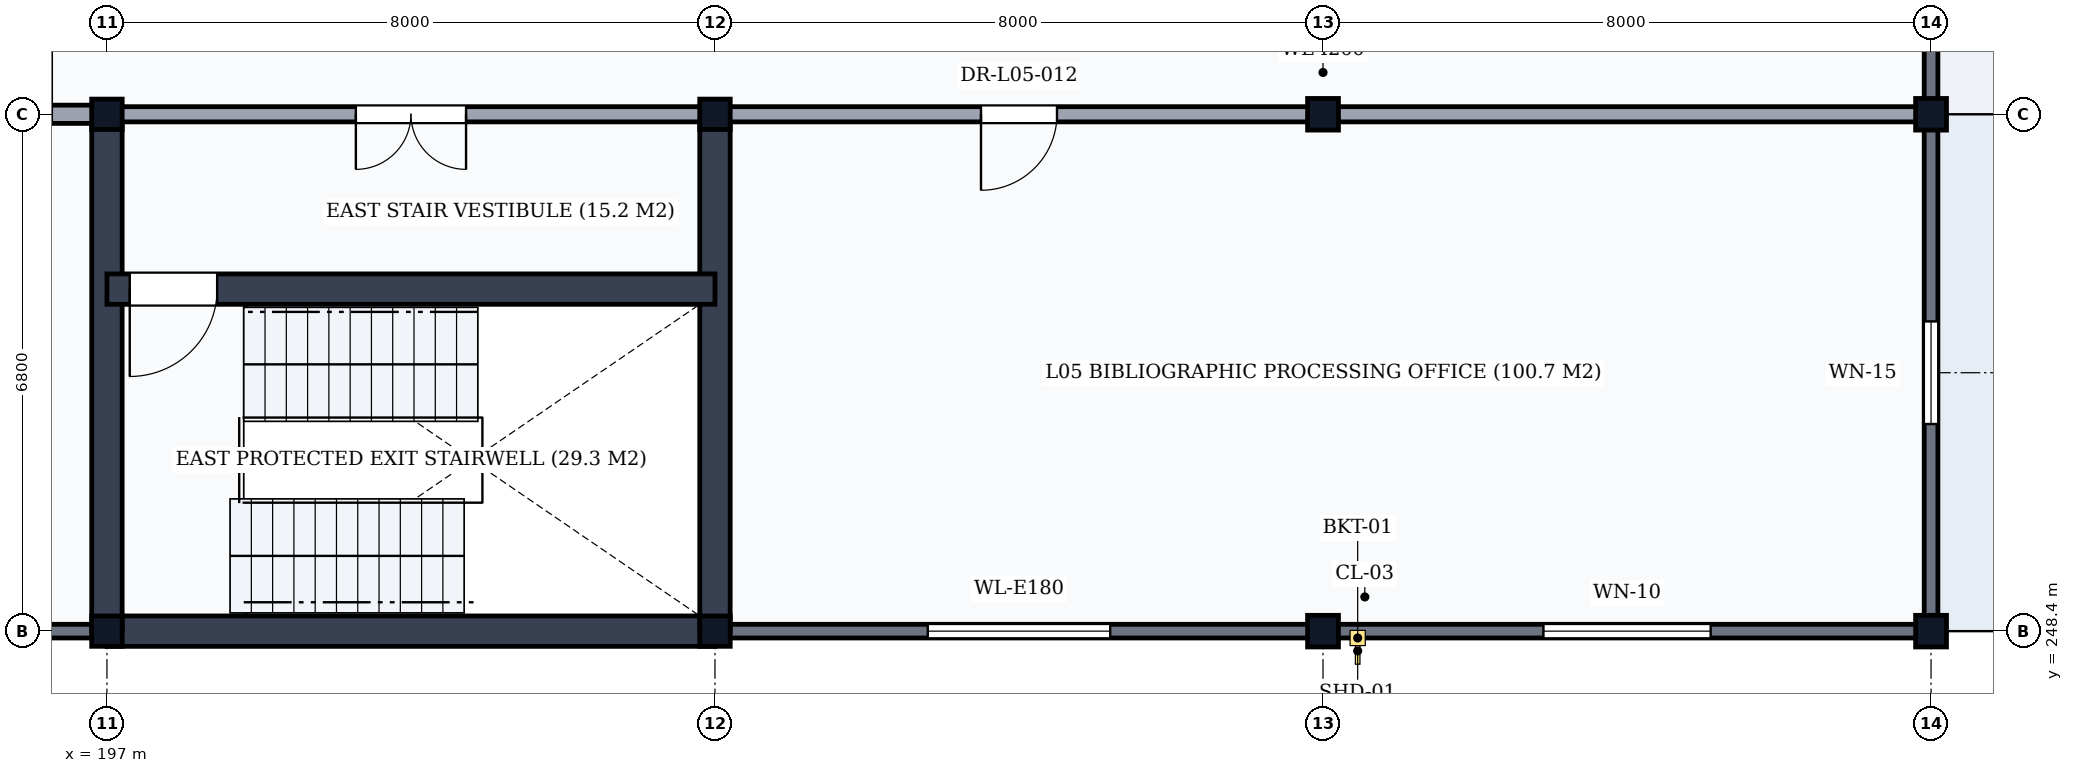
"""IFC4 building model, lengths in metres.
Left out: names, types, materials, properties, quantities, classifications, styles, units other than length and angle.
Written with IfcOpenShell. Run it as: python <this file> out.ifc"""

import sys

from ifc_helpers import new_model, si_unit, direction, frame, frame_2d, origin, origin_2d, place, context, subcontext, project, spatial, rectangle, i_section, extrude, element, fill, save


model = new_model("IFC4")
c1 = context("Model", 3, precision=1e-05, world=origin(), true_north=direction((0.0, 1.0)))
c2 = subcontext(c1, "Body", "Model", "MODEL_VIEW")
j1 = project(units=[si_unit("LENGTHUNIT", "METRE"), si_unit("PLANEANGLEUNIT", "RADIAN")], contexts=[c1])
p1 = place(None, origin())
s1 = spatial("IfcSite", under=j1, at=p1, CompositionType="ELEMENT")
p2 = place(p1, origin())
s2 = spatial("IfcBuilding", under=s1, at=p2, CompositionType="ELEMENT")
p3 = place(p2, frame((0.0, 0.0, 20.4)))
s3 = spatial("IfcBuildingStorey", under=s2, at=p3, CompositionType="ELEMENT", Elevation=20.4)
for number, where, z_axis, x_axis in (
    (1, (197.0, 248.4, 0.0), (0.0, 0.0, 1.0), (1.0, 0.0, 0.0)),
    (2, (197.0, 255.2, 0.0), (0.0, 0.0, 1.0), (1.0, 0.0, 0.0)),
    (3, (205.0, 248.4, 0.0), (0.0, 0.0, 1.0), (1.0, 0.0, 0.0)),
    (4, (205.0, 255.2, 0.0), (0.0, 0.0, 1.0), (1.0, 0.0, 0.0)),
):
    element("IfcColumn", number, at=place(p3, frame(where, z_axis=z_axis, x_axis=x_axis)), inside=s3, PredefinedType="COLUMN", context=c2, shape_type="SweptSolid", body=[
        extrude(i_section(OverallWidth=0.401, OverallDepth=0.399, WebThickness=0.025, FlangeThickness=0.04, FilletRadius=0.015, at=origin_2d()), origin(), (0.0, 0.0, 1.0), 3.9),
    ])
for number, where, z_axis, x_axis in (
    (5, (213.0, 248.4, 0.0), (0.0, 0.0, 1.0), (1.0, 0.0, 0.0)),
    (6, (213.0, 255.2, 0.0), (0.0, 0.0, 1.0), (1.0, 0.0, 0.0)),
    (7, (221.0, 248.4, 0.0), (0.0, 0.0, 1.0), (1.0, 0.0, 0.0)),
    (8, (221.0, 255.2, 0.0), (0.0, 0.0, 1.0), (1.0, 0.0, 0.0)),
):
    element("IfcColumn", number, at=place(p3, frame(where, z_axis=z_axis, x_axis=x_axis)), inside=s3, PredefinedType="COLUMN", context=c2, shape_type="SweptSolid", body=[
        extrude(i_section(OverallWidth=0.406, OverallDepth=0.416, WebThickness=0.03, FlangeThickness=0.048, FilletRadius=0.015, at=origin_2d()), origin(), (0.0, 0.0, 1.0), 3.9),
    ])
p4 = place(p3, frame((189.006, 248.4, 0.0), z_axis=(0.0, 0.0, 1.0), x_axis=(1.0, 0.0, 0.0)))
e9 = element("IfcWall", 9, at=p4, inside=s3, PredefinedType="SOLIDWALL", context=c2, shape_type="SweptSolid", body=[
    extrude(rectangle(XDim=7.988, YDim=0.18, at=frame_2d((3.994, 0.0))), origin(), (0.0, 0.0, 1.0), 3.348),
])
p5 = place(p3, frame((205.006, 248.4, 0.0), z_axis=(0.0, 0.0, 1.0), x_axis=(1.0, 0.0, 0.0)))
e10 = element("IfcWall", 10, at=p5, inside=s3, PredefinedType="SOLIDWALL", context=c2, shape_type="SweptSolid", body=[
    extrude(rectangle(XDim=7.988, YDim=0.18, at=frame_2d((3.994, 0.0))), origin(), (0.0, 0.0, 1.0), 3.348),
])
p6 = place(p5, frame((2.794, 0.0, 0.95)))
e11 = element("IfcOpeningElement", 11, at=p6, cuts=e10, PredefinedType="OPENING", context=c2, shape_type="SweptSolid", body=[
    extrude(rectangle(XDim=2.4, YDim=2.2, at=frame_2d((1.2, 1.1))), frame((0.0, 0.105, 0.0), z_axis=(0.0, -1.0, 0.0), x_axis=(1.0, 0.0, 0.0)), (0.0, 0.0, 1.0), 0.21),
])
p7 = place(p3, frame((213.006, 248.4, 0.0), z_axis=(0.0, 0.0, 1.0), x_axis=(1.0, 0.0, 0.0)))
e12 = element("IfcWall", 12, at=p7, inside=s3, PredefinedType="SOLIDWALL", context=c2, shape_type="SweptSolid", body=[
    extrude(rectangle(XDim=7.988, YDim=0.18, at=frame_2d((3.994, 0.0))), origin(), (0.0, 0.0, 1.0), 3.348),
])
p8 = place(p7, frame((2.894, 0.0, 0.95)))
e13 = element("IfcOpeningElement", 13, at=p8, cuts=e12, PredefinedType="OPENING", context=c2, shape_type="SweptSolid", body=[
    extrude(rectangle(XDim=2.2, YDim=2.1, at=frame_2d((1.1, 1.05))), frame((0.0, 0.105, 0.0), z_axis=(0.0, -1.0, 0.0), x_axis=(1.0, 0.0, 0.0)), (0.0, 0.0, 1.0), 0.21),
])
p9 = place(p3, frame((221.0, 248.406, 0.0), z_axis=(0.0, 0.0, 1.0), x_axis=(0.0, 1.0, 0.0)))
e14 = element("IfcWall", 14, at=p9, inside=s3, PredefinedType="SOLIDWALL", context=c2, shape_type="SweptSolid", body=[
    extrude(rectangle(XDim=6.788, YDim=0.18, at=frame_2d((3.394, 0.0))), origin(), (0.0, 0.0, 1.0), 3.428),
])
p10 = place(p9, frame((2.719, 0.0, 0.95)))
e15 = element("IfcOpeningElement", 15, at=p10, cuts=e14, PredefinedType="OPENING", context=c2, shape_type="SweptSolid", body=[
    extrude(rectangle(XDim=1.35, YDim=1.8, at=frame_2d((0.675, 0.9))), frame((0.0, 0.105, 0.0), z_axis=(0.0, -1.0, 0.0), x_axis=(1.0, 0.0, 0.0)), (0.0, 0.0, 1.0), 0.21),
])
p11 = place(p3, frame((221.0, 255.206, 0.0), z_axis=(0.0, 0.0, 1.0), x_axis=(0.0, 1.0, 0.0)))
e16 = element("IfcWall", 16, at=p11, inside=s3, PredefinedType="SOLIDWALL", context=c2, shape_type="SweptSolid", body=[
    extrude(rectangle(XDim=7.588, YDim=0.18, at=frame_2d((3.794, 0.0))), origin(), (0.0, 0.0, 1.0), 3.388),
])
p12 = place(p11, frame((4.466, 0.0, 0.95)))
e17 = element("IfcOpeningElement", 17, at=p12, cuts=e16, PredefinedType="OPENING", context=c2, shape_type="SweptSolid", body=[
    extrude(rectangle(XDim=1.2, YDim=1.8, at=frame_2d((0.6, 0.9))), frame((0.0, 0.105, 0.0), z_axis=(0.0, -1.0, 0.0), x_axis=(1.0, 0.0, 0.0)), (0.0, 0.0, 1.0), 0.21),
])
p13 = place(p3, frame((197.0, 248.4, 0.0), z_axis=(0.0, 0.0, 1.0), x_axis=(1.0, 0.0, 0.0)))
e18 = element("IfcWall", 18, at=p13, inside=s3, PredefinedType="SHEAR", context=c2, shape_type="SweptSolid", body=[
    extrude(rectangle(XDim=8.0, YDim=0.4, at=frame_2d((4.0, 0.0))), origin(), (0.0, 0.0, 1.0), 3.66),
])
for number, where, z_axis, x_axis in (
    (19, (197.0, 248.4, 0.0), (0.0, 0.0, 1.0), (0.0, 1.0, 0.0)),
    (20, (205.0, 248.4, 0.0), (0.0, 0.0, 1.0), (0.0, 1.0, 0.0)),
):
    element("IfcWall", number, at=place(p3, frame(where, z_axis=z_axis, x_axis=x_axis)), inside=s3, PredefinedType="SHEAR", context=c2, shape_type="SweptSolid", body=[
        extrude(rectangle(XDim=6.8, YDim=0.4, at=frame_2d((3.4, 0.0))), origin(), (0.0, 0.0, 1.0), 3.66),
    ])
p14 = place(p3, frame((197.0, 252.9, 0.0), z_axis=(0.0, 0.0, 1.0), x_axis=(1.0, 0.0, 0.0)))
e21 = element("IfcWall", 21, at=p14, inside=s3, PredefinedType="SHEAR", context=c2, shape_type="SweptSolid", body=[
    extrude(rectangle(XDim=8.0, YDim=0.4, at=frame_2d((4.0, 0.0))), origin(), (0.0, 0.0, 1.0), 3.66),
])
p15 = place(p14, frame((0.3, 0.0, 0.0)))
e22 = element("IfcOpeningElement", 22, at=p15, cuts=e21, PredefinedType="OPENING", context=c2, shape_type="SweptSolid", body=[
    extrude(rectangle(XDim=1.15, YDim=2.15, at=frame_2d((0.575, 1.075))), frame((0.0, 0.215, 0.0), z_axis=(0.0, -1.0, 0.0), x_axis=(1.0, 0.0, 0.0)), (0.0, 0.0, 1.0), 0.43),
])
p16 = place(p3, frame((197.0, 255.2, 0.0), z_axis=(0.0, 0.0, 1.0), x_axis=(1.0, 0.0, 0.0)))
e23 = element("IfcWall", 23, at=p16, inside=s3, PredefinedType="PARTITIONING", context=c2, shape_type="SweptSolid", body=[
    extrude(rectangle(XDim=8.0, YDim=0.2, at=frame_2d((4.0, 0.0))), origin(), (0.0, 0.0, 1.0), 3.058),
])
p17 = place(p16, frame((3.275, 0.0, 0.0)))
e24 = element("IfcOpeningElement", 24, at=p17, cuts=e23, PredefinedType="OPENING", context=c2, shape_type="SweptSolid", body=[
    extrude(rectangle(XDim=1.45, YDim=2.2, at=frame_2d((0.725, 1.1))), frame((0.0, 0.115, 0.0), z_axis=(0.0, -1.0, 0.0), x_axis=(1.0, 0.0, 0.0)), (0.0, 0.0, 1.0), 0.23),
])
p18 = place(p3, frame((189.0, 255.2, 0.0), z_axis=(0.0, 0.0, 1.0), x_axis=(1.0, 0.0, 0.0)))
e25 = element("IfcWall", 25, at=p18, inside=s3, PredefinedType="PARTITIONING", context=c2, shape_type="SweptSolid", body=[
    extrude(rectangle(XDim=8.0, YDim=0.24, at=frame_2d((4.0, 0.0))), origin(), (0.0, 0.0, 1.0), 3.058),
])
p19 = place(p18, frame((1.05, 0.0, 0.0)))
e26 = element("IfcOpeningElement", 26, at=p19, cuts=e25, PredefinedType="OPENING", context=c2, shape_type="SweptSolid", body=[
    extrude(rectangle(XDim=1.0, YDim=2.1, at=frame_2d((0.5, 1.05))), frame((0.0, 0.135, 0.0), z_axis=(0.0, -1.0, 0.0), x_axis=(1.0, 0.0, 0.0)), (0.0, 0.0, 1.0), 0.27),
])
p20 = place(p18, frame((3.6, 0.0, 0.0)))
e27 = element("IfcOpeningElement", 27, at=p20, cuts=e25, PredefinedType="OPENING", context=c2, shape_type="SweptSolid", body=[
    extrude(rectangle(XDim=1.5, YDim=2.25, at=frame_2d((0.75, 1.125))), frame((0.0, 0.135, 0.0), z_axis=(0.0, -1.0, 0.0), x_axis=(1.0, 0.0, 0.0)), (0.0, 0.0, 1.0), 0.27),
])
p21 = place(p18, frame((6.425, 0.0, 0.0)))
e28 = element("IfcOpeningElement", 28, at=p21, cuts=e25, PredefinedType="OPENING", context=c2, shape_type="SweptSolid", body=[
    extrude(rectangle(XDim=0.85, YDim=2.1, at=frame_2d((0.425, 1.05))), frame((0.0, 0.135, 0.0), z_axis=(0.0, -1.0, 0.0), x_axis=(1.0, 0.0, 0.0)), (0.0, 0.0, 1.0), 0.27),
])
p22 = place(p3, frame((205.0, 255.2, 0.0), z_axis=(0.0, 0.0, 1.0), x_axis=(1.0, 0.0, 0.0)))
e29 = element("IfcWall", 29, at=p22, inside=s3, PredefinedType="PARTITIONING", context=c2, shape_type="SweptSolid", body=[
    extrude(rectangle(XDim=16.0, YDim=0.2, at=frame_2d((8.0, 0.0))), origin(), (0.0, 0.0, 1.0), 3.058),
])
p23 = place(p22, frame((3.5, 0.0, 0.0)))
e30 = element("IfcOpeningElement", 30, at=p23, cuts=e29, PredefinedType="OPENING", context=c2, shape_type="SweptSolid", body=[
    extrude(rectangle(XDim=1.0, YDim=2.1, at=frame_2d((0.5, 1.05))), frame((0.0, 0.115, 0.0), z_axis=(0.0, -1.0, 0.0), x_axis=(1.0, 0.0, 0.0)), (0.0, 0.0, 1.0), 0.23),
])
p24 = place(p6, origin())
e31 = element("IfcWindow", 31, at=p24, inside=s3, PartitioningType="DOUBLE_PANEL_VERTICAL", PredefinedType="WINDOW", context=c2, shape_type="SweptSolid", body=[
    extrude(rectangle(XDim=2.4, YDim=2.2, at=frame_2d((1.2, 1.1))), frame((0.0, 0.03, 0.0), z_axis=(0.0, -1.0, 0.0), x_axis=(1.0, 0.0, 0.0)), (0.0, 0.0, 1.0), 0.06),
])
fill(e11, e31)
p25 = place(p8, origin())
e32 = element("IfcWindow", 32, at=p25, inside=s3, PartitioningType="DOUBLE_PANEL_VERTICAL", PredefinedType="WINDOW", context=c2, shape_type="SweptSolid", body=[
    extrude(rectangle(XDim=2.2, YDim=2.1, at=frame_2d((1.1, 1.05))), frame((0.0, 0.03, 0.0), z_axis=(0.0, -1.0, 0.0), x_axis=(1.0, 0.0, 0.0)), (0.0, 0.0, 1.0), 0.06),
])
fill(e13, e32)
p26 = place(p10, origin())
e33 = element("IfcWindow", 33, at=p26, inside=s3, PartitioningType="SINGLE_PANEL", PredefinedType="WINDOW", context=c2, shape_type="SweptSolid", body=[
    extrude(rectangle(XDim=1.35, YDim=1.8, at=frame_2d((0.675, 0.9))), frame((0.0, 0.03, 0.0), z_axis=(0.0, -1.0, 0.0), x_axis=(1.0, 0.0, 0.0)), (0.0, 0.0, 1.0), 0.06),
])
fill(e15, e33)
p27 = place(p15, frame((1.15, 0.0, 0.0), z_axis=(0.0, 0.0, 1.0), x_axis=(-1.0, 0.0, 0.0)))
e34 = element("IfcDoor", 34, at=p27, inside=s3, OperationType="SINGLE_SWING_RIGHT", PredefinedType="DOOR", context=c2, shape_type="SweptSolid", body=[
    extrude(rectangle(XDim=1.15, YDim=2.15, at=frame_2d((0.575, 1.075))), frame((0.0, 0.025, 0.0), z_axis=(0.0, -1.0, 0.0), x_axis=(1.0, 0.0, 0.0)), (0.0, 0.0, 1.0), 0.05),
])
fill(e22, e34)
p28 = place(p17, frame((1.45, 0.0, 0.0), z_axis=(0.0, 0.0, 1.0), x_axis=(-1.0, 0.0, 0.0)))
e35 = element("IfcDoor", 35, at=p28, inside=s3, OperationType="DOUBLE_DOOR_SINGLE_SWING", PredefinedType="DOOR", context=c2, shape_type="SweptSolid", body=[
    extrude(rectangle(XDim=1.45, YDim=2.2, at=frame_2d((0.725, 1.1))), frame((0.0, 0.025, 0.0), z_axis=(0.0, -1.0, 0.0), x_axis=(1.0, 0.0, 0.0)), (0.0, 0.0, 1.0), 0.05),
])
fill(e24, e35)
p29 = place(p23, frame((1.0, 0.0, 0.0), z_axis=(0.0, 0.0, 1.0), x_axis=(-1.0, 0.0, 0.0)))
e36 = element("IfcDoor", 36, at=p29, inside=s3, OperationType="SINGLE_SWING_RIGHT", PredefinedType="DOOR", context=c2, shape_type="SweptSolid", body=[
    extrude(rectangle(XDim=1.0, YDim=2.1, at=frame_2d((0.5, 1.05))), frame((0.0, 0.025, 0.0), z_axis=(0.0, -1.0, 0.0), x_axis=(1.0, 0.0, 0.0)), (0.0, 0.0, 1.0), 0.05),
])
fill(e30, e36)
save(model, sys.argv[1])
